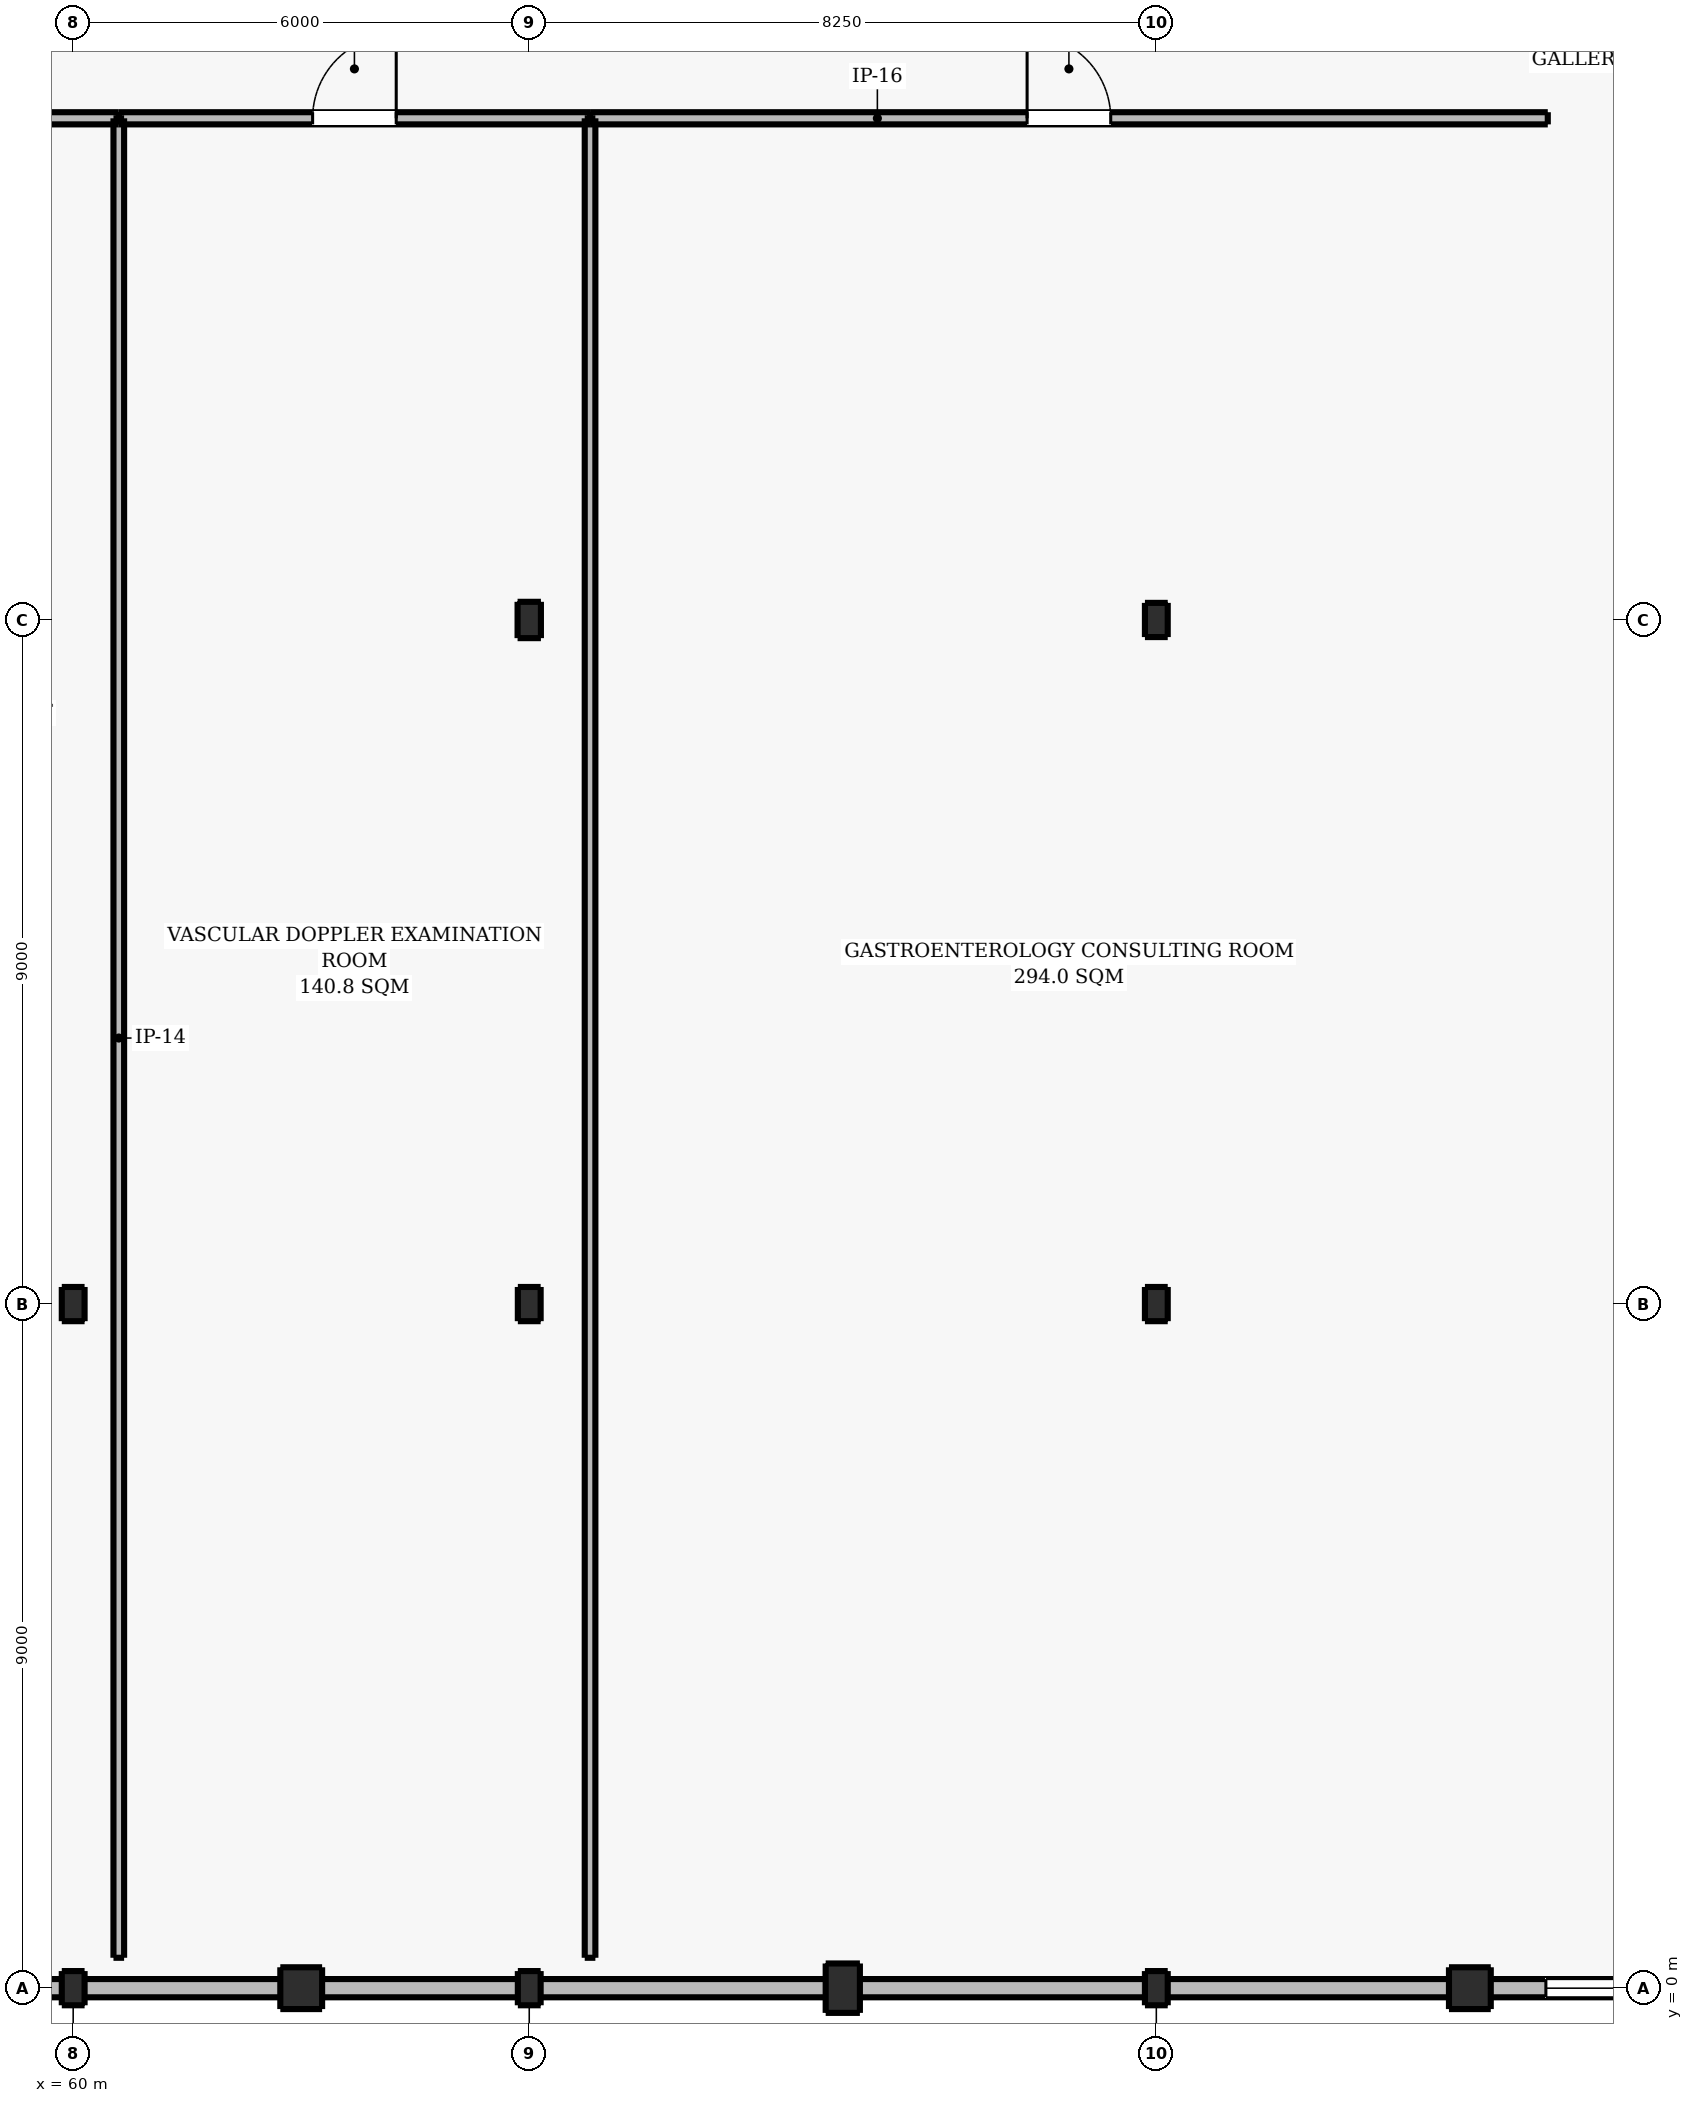
"""IFC4 building model, lengths in metres.
Left out: names, types, materials, properties, quantities, classifications, styles, units other than length and angle.
Written with IfcOpenShell. Run it as: python <this file> out.ifc"""

import sys

from ifc_helpers import new_model, si_unit, direction, frame, frame_2d, origin, origin_2d, place, context, subcontext, project, spatial, rectangle, i_section, extrude, element, fill, save


model = new_model("IFC4")
c1 = context("Model", 3, precision=1e-05, world=origin(), true_north=direction((0.0, 1.0)))
c2 = subcontext(c1, "Body", "Model", "MODEL_VIEW")
j1 = project(units=[si_unit("LENGTHUNIT", "METRE"), si_unit("PLANEANGLEUNIT", "RADIAN")], contexts=[c1])
p1 = place(None, origin())
s1 = spatial("IfcSite", under=j1, at=p1, CompositionType="ELEMENT")
p2 = place(p1, origin())
s2 = spatial("IfcBuilding", under=s1, at=p2, CompositionType="ELEMENT")
p3 = place(p2, frame((0.0, 0.0, 5.1)))
s3 = spatial("IfcBuildingStorey", under=s2, at=p3, CompositionType="ELEMENT", Elevation=5.1)
for number, where, z_axis, x_axis in (
    (1, (60.0, 0.0, 0.0), (0.0, 0.0, 1.0), (1.0, 0.0, 0.0)),
    (2, (60.0, 9.0, 0.0), (0.0, 0.0, 1.0), (1.0, 0.0, 0.0)),
):
    element("IfcColumn", number, at=place(p3, frame(where, z_axis=z_axis, x_axis=x_axis)), inside=s3, PredefinedType="COLUMN", context=c2, shape_type="SweptSolid", body=[
        extrude(i_section(OverallWidth=0.3, OverallDepth=0.45, WebThickness=0.014, FlangeThickness=0.026, FilletRadius=0.027, at=origin_2d()), origin(), (0.0, 0.0, 1.0), 4.5),
    ])
p4 = place(p3, frame((63.0, 0.0, 0.0), z_axis=(0.0, 0.0, 1.0), x_axis=(1.0, 0.0, 0.0)))
e3 = element("IfcColumn", 3, at=p4, inside=s3, PredefinedType="PILASTER", context=c2, shape_type="SweptSolid", body=[
    extrude(rectangle(XDim=0.55, YDim=0.55, at=origin_2d()), origin(), (0.0, 0.0, 1.0), 4.5),
])
for number, where, z_axis, x_axis in (
    (4, (66.0, 0.0, 0.0), (0.0, 0.0, 1.0), (1.0, 0.0, 0.0)),
    (5, (66.0, 9.0, 0.0), (0.0, 0.0, 1.0), (1.0, 0.0, 0.0)),
):
    element("IfcColumn", number, at=place(p3, frame(where, z_axis=z_axis, x_axis=x_axis)), inside=s3, PredefinedType="COLUMN", context=c2, shape_type="SweptSolid", body=[
        extrude(i_section(OverallWidth=0.3, OverallDepth=0.45, WebThickness=0.014, FlangeThickness=0.026, FilletRadius=0.027, at=origin_2d()), origin(), (0.0, 0.0, 1.0), 4.5),
    ])
p5 = place(p3, frame((66.0, 18.0, 0.0), z_axis=(0.0, 0.0, 1.0), x_axis=(1.0, 0.0, 0.0)))
e6 = element("IfcColumn", 6, at=p5, inside=s3, PredefinedType="COLUMN", context=c2, shape_type="SweptSolid", body=[
    extrude(i_section(OverallWidth=0.307, OverallDepth=0.478, WebThickness=0.021, FlangeThickness=0.04, FilletRadius=0.027, at=origin_2d()), origin(), (0.0, 0.0, 1.0), 4.5),
])
p6 = place(p3, frame((70.125, 0.0, 0.0), z_axis=(0.0, 0.0, 1.0), x_axis=(1.0, 0.0, 0.0)))
e7 = element("IfcColumn", 7, at=p6, inside=s3, PredefinedType="PILASTER", context=c2, shape_type="SweptSolid", body=[
    extrude(rectangle(XDim=0.45, YDim=0.65, at=origin_2d()), origin(), (0.0, 0.0, 1.0), 4.5),
])
for number, where, z_axis, x_axis in (
    (8, (74.25, 0.0, 0.0), (0.0, 0.0, 1.0), (1.0, 0.0, 0.0)),
    (9, (74.25, 9.0, 0.0), (0.0, 0.0, 1.0), (1.0, 0.0, 0.0)),
    (10, (74.25, 18.0, 0.0), (0.0, 0.0, 1.0), (1.0, 0.0, 0.0)),
):
    element("IfcColumn", number, at=place(p3, frame(where, z_axis=z_axis, x_axis=x_axis)), inside=s3, PredefinedType="COLUMN", context=c2, shape_type="SweptSolid", body=[
        extrude(i_section(OverallWidth=0.3, OverallDepth=0.45, WebThickness=0.014, FlangeThickness=0.026, FilletRadius=0.027, at=origin_2d()), origin(), (0.0, 0.0, 1.0), 4.5),
    ])
p7 = place(p3, frame((78.375, 0.0, 0.0), z_axis=(0.0, 0.0, 1.0), x_axis=(1.0, 0.0, 0.0)))
e11 = element("IfcColumn", 11, at=p7, inside=s3, PredefinedType="PILASTER", context=c2, shape_type="SweptSolid", body=[
    extrude(rectangle(XDim=0.55, YDim=0.55, at=origin_2d()), origin(), (0.0, 0.0, 1.0), 4.5),
])
p8 = place(p3, frame((111.0, 0.0, 0.0), z_axis=(0.0, 0.0, 1.0), x_axis=(-1.0, 0.0, 0.0)))
e12 = element("IfcWall", 12, at=p8, inside=s3, PredefinedType="SOLIDWALL", context=c2, shape_type="SweptSolid", body=[
    extrude(rectangle(XDim=57.0, YDim=0.24, at=frame_2d((28.5, 0.0))), origin(), (0.0, 0.0, 1.0), 3.28),
])
p9 = place(p8, frame((1.625, 0.0, 0.95)))
e13 = element("IfcOpeningElement", 13, at=p9, cuts=e12, PredefinedType="OPENING", context=c2, shape_type="SweptSolid", body=[
    extrude(rectangle(XDim=1.5, YDim=1.6, at=frame_2d((0.75, 0.8))), frame((0.0, 0.13, 0.0), z_axis=(0.0, -1.0, 0.0), x_axis=(1.0, 0.0, 0.0)), (0.0, 0.0, 1.0), 0.26),
])
p10 = place(p8, frame((25.375, 0.0, 0.95)))
e14 = element("IfcOpeningElement", 14, at=p10, cuts=e12, PredefinedType="OPENING", context=c2, shape_type="SweptSolid", body=[
    extrude(rectangle(XDim=1.5, YDim=1.6, at=frame_2d((0.75, 0.8))), frame((0.0, 0.13, 0.0), z_axis=(0.0, -1.0, 0.0), x_axis=(1.0, 0.0, 0.0)), (0.0, 0.0, 1.0), 0.26),
])
p11 = place(p8, frame((30.125, 0.0, 0.95)))
e15 = element("IfcOpeningElement", 15, at=p11, cuts=e12, PredefinedType="OPENING", context=c2, shape_type="SweptSolid", body=[
    extrude(rectangle(XDim=1.5, YDim=1.6, at=frame_2d((0.75, 0.8))), frame((0.0, 0.13, 0.0), z_axis=(0.0, -1.0, 0.0), x_axis=(1.0, 0.0, 0.0)), (0.0, 0.0, 1.0), 0.26),
])
p12 = place(p3, frame((54.4, 24.6, 0.0), z_axis=(0.0, 0.0, 1.0), x_axis=(1.0, 0.0, 0.0)))
e16 = element("IfcWall", 16, at=p12, inside=s3, PredefinedType="PARTITIONING", context=c2, shape_type="SweptSolid", body=[
    extrude(rectangle(XDim=6.2, YDim=0.16, at=frame_2d((3.1, 0.0))), origin(), (0.0, 0.0, 1.0), 4.21),
])
p13 = place(p12, frame((2.55, 0.0, 0.0)))
e17 = element("IfcOpeningElement", 17, at=p13, cuts=e16, PredefinedType="OPENING", context=c2, shape_type="SweptSolid", body=[
    extrude(rectangle(XDim=1.1, YDim=2.15, at=frame_2d((0.55, 1.075))), frame((0.0, 0.09, 0.0), z_axis=(0.0, -1.0, 0.0), x_axis=(1.0, 0.0, 0.0)), (0.0, 0.0, 1.0), 0.18),
])
p14 = place(p3, frame((60.6, 0.4, 0.0), z_axis=(0.0, 0.0, 1.0), x_axis=(0.0, 1.0, 0.0)))
e18 = element("IfcWall", 18, at=p14, inside=s3, PredefinedType="PARTITIONING", context=c2, shape_type="SweptSolid", body=[
    extrude(rectangle(XDim=24.2, YDim=0.14, at=frame_2d((12.1, 0.0))), origin(), (0.0, 0.0, 1.0), 4.21),
])
p15 = place(p3, frame((60.6, 24.6, 0.0), z_axis=(0.0, 0.0, 1.0), x_axis=(1.0, 0.0, 0.0)))
e19 = element("IfcWall", 19, at=p15, inside=s3, PredefinedType="PARTITIONING", context=c2, shape_type="SweptSolid", body=[
    extrude(rectangle(XDim=6.2, YDim=0.16, at=frame_2d((3.1, 0.0))), origin(), (0.0, 0.0, 1.0), 4.21),
])
p16 = place(p15, frame((2.55, 0.0, 0.0)))
e20 = element("IfcOpeningElement", 20, at=p16, cuts=e19, PredefinedType="OPENING", context=c2, shape_type="SweptSolid", body=[
    extrude(rectangle(XDim=1.1, YDim=2.15, at=frame_2d((0.55, 1.075))), frame((0.0, 0.09, 0.0), z_axis=(0.0, -1.0, 0.0), x_axis=(1.0, 0.0, 0.0)), (0.0, 0.0, 1.0), 0.18),
])
p17 = place(p3, frame((66.8, 0.4, 0.0), z_axis=(0.0, 0.0, 1.0), x_axis=(0.0, 1.0, 0.0)))
e21 = element("IfcWall", 21, at=p17, inside=s3, PredefinedType="PARTITIONING", context=c2, shape_type="SweptSolid", body=[
    extrude(rectangle(XDim=24.2, YDim=0.14, at=frame_2d((12.1, 0.0))), origin(), (0.0, 0.0, 1.0), 4.21),
])
p18 = place(p3, frame((66.8, 24.6, 0.0), z_axis=(0.0, 0.0, 1.0), x_axis=(1.0, 0.0, 0.0)))
e22 = element("IfcWall", 22, at=p18, inside=s3, PredefinedType="PARTITIONING", context=c2, shape_type="SweptSolid", body=[
    extrude(rectangle(XDim=12.6, YDim=0.16, at=frame_2d((6.3, 0.0))), origin(), (0.0, 0.0, 1.0), 4.21),
])
p19 = place(p18, frame((5.75, 0.0, 0.0)))
e23 = element("IfcOpeningElement", 23, at=p19, cuts=e22, PredefinedType="OPENING", context=c2, shape_type="SweptSolid", body=[
    extrude(rectangle(XDim=1.1, YDim=2.15, at=frame_2d((0.55, 1.075))), frame((0.0, 0.09, 0.0), z_axis=(0.0, -1.0, 0.0), x_axis=(1.0, 0.0, 0.0)), (0.0, 0.0, 1.0), 0.18),
])
p20 = place(p11, origin())
e24 = element("IfcWindow", 24, at=p20, inside=s3, PartitioningType="SINGLE_PANEL", PredefinedType="WINDOW", context=c2, shape_type="SweptSolid", body=[
    extrude(rectangle(XDim=1.5, YDim=1.6, at=frame_2d((0.75, 0.8))), frame((0.0, 0.03, 0.0), z_axis=(0.0, -1.0, 0.0), x_axis=(1.0, 0.0, 0.0)), (0.0, 0.0, 1.0), 0.06),
])
fill(e15, e24)
p21 = place(p16, origin())
e25 = element("IfcDoor", 25, at=p21, inside=s3, OperationType="SINGLE_SWING_RIGHT", PredefinedType="DOOR", context=c2, shape_type="SweptSolid", body=[
    extrude(rectangle(XDim=1.1, YDim=2.15, at=frame_2d((0.55, 1.075))), frame((0.0, 0.025, 0.0), z_axis=(0.0, -1.0, 0.0), x_axis=(1.0, 0.0, 0.0)), (0.0, 0.0, 1.0), 0.05),
])
fill(e20, e25)
p22 = place(p19, origin())
e26 = element("IfcDoor", 26, at=p22, inside=s3, OperationType="SINGLE_SWING_LEFT", PredefinedType="DOOR", context=c2, shape_type="SweptSolid", body=[
    extrude(rectangle(XDim=1.1, YDim=2.15, at=frame_2d((0.55, 1.075))), frame((0.0, 0.025, 0.0), z_axis=(0.0, -1.0, 0.0), x_axis=(1.0, 0.0, 0.0)), (0.0, 0.0, 1.0), 0.05),
])
fill(e23, e26)
save(model, sys.argv[1])
